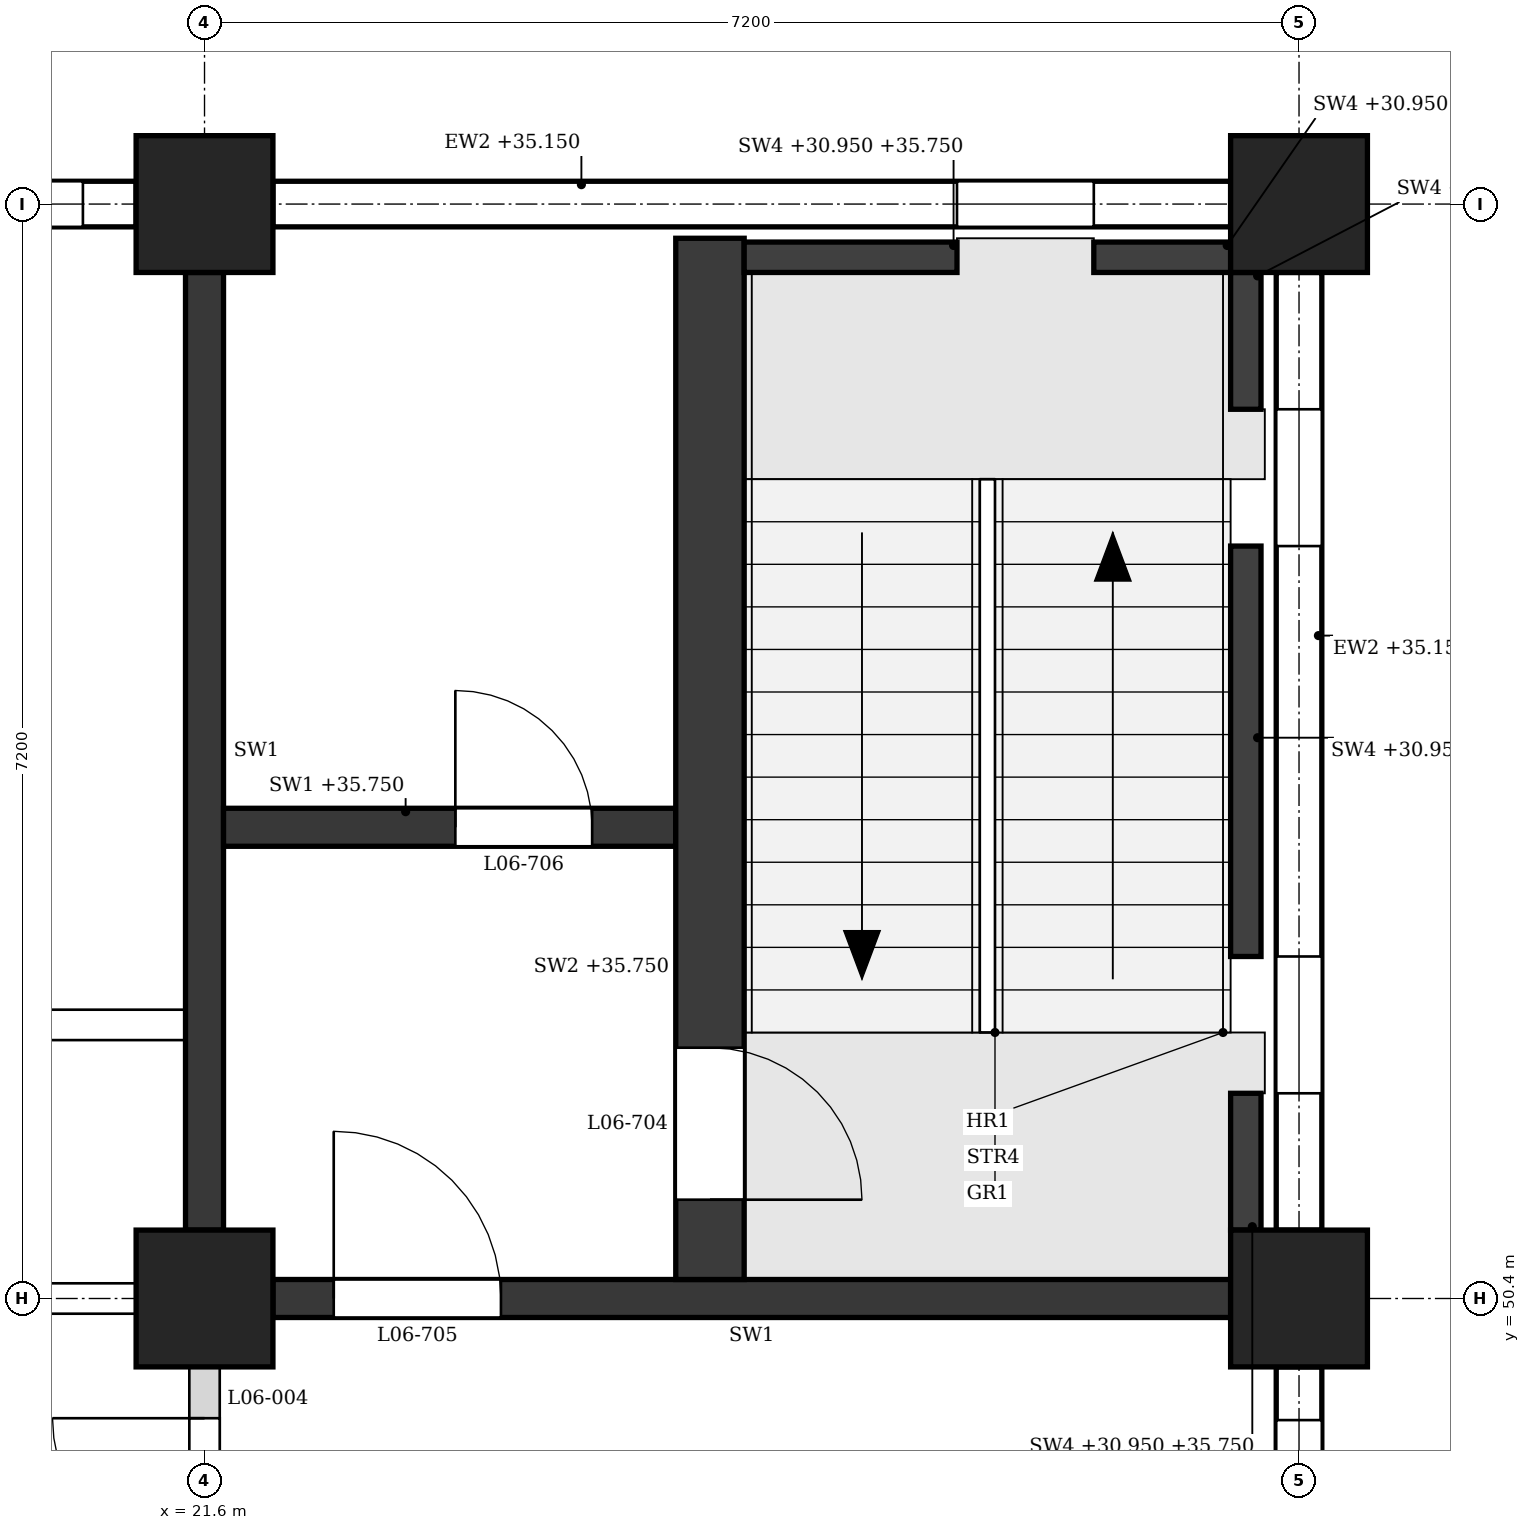
"""IFC4 building model, lengths in metres.
Left out: names, types, materials, properties, quantities, classifications, styles, units other than length and angle.
Written with IfcOpenShell. Run it as: python <this file> out.ifc"""

import sys

from ifc_helpers import new_model, si_unit, direction, frame, frame_2d, origin, origin_2d, place, context, subcontext, project, spatial, polyline, rectangle, outline, extrude, element, fill, save


model = new_model("IFC4")
c1 = context("Model", 3, precision=1e-05, world=origin(), true_north=direction((0.0, 1.0)))
c2 = subcontext(c1, "Body", "Model", "MODEL_VIEW")
j1 = project(units=[si_unit("LENGTHUNIT", "METRE"), si_unit("PLANEANGLEUNIT", "RADIAN")], contexts=[c1])
p1 = place(None, origin())
s1 = spatial("IfcSite", under=j1, at=p1, CompositionType="ELEMENT")
p2 = place(p1, origin())
s2 = spatial("IfcBuilding", under=s1, at=p2, CompositionType="ELEMENT")
p3 = place(p2, frame((0.0, 0.0, 31.2)))
s3 = spatial("IfcBuildingStorey", under=s2, at=p3, CompositionType="ELEMENT", Elevation=31.2)
for number, where, z_axis, x_axis in (
    (1, (21.6, 50.4, 0.0), (0.0, 0.0, 1.0), (1.0, 0.0, 0.0)),
    (2, (21.6, 57.6, 0.0), (0.0, 0.0, 1.0), (1.0, 0.0, 0.0)),
    (3, (28.8, 50.4, 0.0), (0.0, 0.0, 1.0), (1.0, 0.0, 0.0)),
    (4, (28.8, 57.6, 0.0), (0.0, 0.0, 1.0), (1.0, 0.0, 0.0)),
):
    element("IfcColumn", number, at=place(p3, frame(where, z_axis=z_axis, x_axis=x_axis)), inside=s3, PredefinedType="COLUMN", context=c2, shape_type="SweptSolid", body=[
        extrude(rectangle(XDim=0.9, YDim=0.9, at=origin_2d()), origin(), (0.0, 0.0, 1.0), 4.8),
    ])
p4 = place(p3, frame((28.35, 57.6, 0.0), z_axis=(0.0, 0.0, 1.0), x_axis=(-1.0, 0.0, 0.0)))
e5 = element("IfcWall", 5, at=p4, inside=s3, PredefinedType="STANDARD", context=c2, shape_type="SweptSolid", body=[
    extrude(rectangle(XDim=6.3, YDim=0.3, at=frame_2d((3.15, 0.0))), origin(), (0.0, 0.0, 1.0), 3.95),
])
p5 = place(p4, frame((0.9, 0.0, 0.9)))
e6 = element("IfcOpeningElement", 6, at=p5, cuts=e5, PredefinedType="OPENING", context=c2, shape_type="SweptSolid", body=[
    extrude(outline(polyline([(0.0, 0.0), (0.9, 0.0), (0.9, 2.05), (0.45, 2.5), (0.0, 2.05), (0.0, 0.0)])), frame((0.0, 0.16, 0.0), z_axis=(0.0, -1.0, 0.0), x_axis=(1.0, 0.0, 0.0)), (0.0, 0.0, 1.0), 0.32),
])
p6 = place(p3, frame((21.15, 57.6, 0.0), z_axis=(0.0, 0.0, 1.0), x_axis=(-1.0, 0.0, 0.0)))
e7 = element("IfcWall", 7, at=p6, inside=s3, PredefinedType="STANDARD", context=c2, shape_type="SweptSolid", body=[
    extrude(rectangle(XDim=6.3, YDim=0.3, at=frame_2d((3.15, 0.0))), origin(), (0.0, 0.0, 1.0), 3.95),
])
p7 = place(p6, frame((0.35, 0.0, 0.9)))
e8 = element("IfcOpeningElement", 8, at=p7, cuts=e7, PredefinedType="OPENING", context=c2, shape_type="SweptSolid", body=[
    extrude(outline(polyline([(0.0, 0.0), (0.85, 0.0), (0.85, 2.05), (0.425, 2.5), (0.0, 2.05), (0.0, 0.0)])), frame((0.0, 0.16, 0.0), z_axis=(0.0, -1.0, 0.0), x_axis=(1.0, 0.0, 0.0)), (0.0, 0.0, 1.0), 0.32),
])
p8 = place(p6, frame((1.5, 0.0, 0.9)))
e9 = element("IfcOpeningElement", 9, at=p8, cuts=e7, PredefinedType="OPENING", context=c2, shape_type="SweptSolid", body=[
    extrude(outline(polyline([(0.0, 0.0), (0.85, 0.0), (0.85, 2.05), (0.425, 2.5), (0.0, 2.05), (0.0, 0.0)])), frame((0.0, 0.16, 0.0), z_axis=(0.0, -1.0, 0.0), x_axis=(1.0, 0.0, 0.0)), (0.0, 0.0, 1.0), 0.32),
])
p9 = place(p6, frame((3.95, 0.0, 0.9)))
e10 = element("IfcOpeningElement", 10, at=p9, cuts=e7, PredefinedType="OPENING", context=c2, shape_type="SweptSolid", body=[
    extrude(outline(polyline([(0.0, 0.0), (0.85, 0.0), (0.85, 2.05), (0.425, 2.5), (0.0, 2.05), (0.0, 0.0)])), frame((0.0, 0.16, 0.0), z_axis=(0.0, -1.0, 0.0), x_axis=(1.0, 0.0, 0.0)), (0.0, 0.0, 1.0), 0.32),
])
p10 = place(p6, frame((5.1, 0.0, 0.9)))
e11 = element("IfcOpeningElement", 11, at=p10, cuts=e7, PredefinedType="OPENING", context=c2, shape_type="SweptSolid", body=[
    extrude(outline(polyline([(0.0, 0.0), (0.85, 0.0), (0.85, 2.05), (0.425, 2.5), (0.0, 2.05), (0.0, 0.0)])), frame((0.0, 0.16, 0.0), z_axis=(0.0, -1.0, 0.0), x_axis=(1.0, 0.0, 0.0)), (0.0, 0.0, 1.0), 0.32),
])
p11 = place(p3, frame((28.8, 43.65, 0.0), z_axis=(0.0, 0.0, 1.0), x_axis=(0.0, 1.0, 0.0)))
e12 = element("IfcWall", 12, at=p11, inside=s3, PredefinedType="STANDARD", context=c2, shape_type="SweptSolid", body=[
    extrude(rectangle(XDim=6.3, YDim=0.3, at=frame_2d((3.15, 0.0))), origin(), (0.0, 0.0, 1.0), 3.95),
])
p12 = place(p11, frame((3.95, 0.0, 0.9)))
e13 = element("IfcOpeningElement", 13, at=p12, cuts=e12, PredefinedType="OPENING", context=c2, shape_type="SweptSolid", body=[
    extrude(outline(polyline([(0.0, 0.0), (0.85, 0.0), (0.85, 2.05), (0.425, 2.5), (0.0, 2.05), (0.0, 0.0)])), frame((0.0, 0.16, 0.0), z_axis=(0.0, -1.0, 0.0), x_axis=(1.0, 0.0, 0.0)), (0.0, 0.0, 1.0), 0.32),
])
p13 = place(p11, frame((5.1, 0.0, 0.9)))
e14 = element("IfcOpeningElement", 14, at=p13, cuts=e12, PredefinedType="OPENING", context=c2, shape_type="SweptSolid", body=[
    extrude(outline(polyline([(0.0, 0.0), (0.85, 0.0), (0.85, 2.05), (0.425, 2.5), (0.0, 2.05), (0.0, 0.0)])), frame((0.0, 0.16, 0.0), z_axis=(0.0, -1.0, 0.0), x_axis=(1.0, 0.0, 0.0)), (0.0, 0.0, 1.0), 0.32),
])
p14 = place(p3, frame((28.8, 50.85, 0.0), z_axis=(0.0, 0.0, 1.0), x_axis=(0.0, 1.0, 0.0)))
e15 = element("IfcWall", 15, at=p14, inside=s3, PredefinedType="STANDARD", context=c2, shape_type="SweptSolid", body=[
    extrude(rectangle(XDim=6.3, YDim=0.3, at=frame_2d((3.15, 0.0))), origin(), (0.0, 0.0, 1.0), 3.95),
])
p15 = place(p14, frame((0.9, 0.0, 0.9)))
e16 = element("IfcOpeningElement", 16, at=p15, cuts=e15, PredefinedType="OPENING", context=c2, shape_type="SweptSolid", body=[
    extrude(outline(polyline([(0.0, 0.0), (0.9, 0.0), (0.9, 2.05), (0.45, 2.5), (0.0, 2.05), (0.0, 0.0)])), frame((0.0, 0.16, 0.0), z_axis=(0.0, -1.0, 0.0), x_axis=(1.0, 0.0, 0.0)), (0.0, 0.0, 1.0), 0.32),
])
p16 = place(p14, frame((4.5, 0.0, 0.9)))
e17 = element("IfcOpeningElement", 17, at=p16, cuts=e15, PredefinedType="OPENING", context=c2, shape_type="SweptSolid", body=[
    extrude(outline(polyline([(0.0, 0.0), (0.9, 0.0), (0.9, 2.05), (0.45, 2.5), (0.0, 2.05), (0.0, 0.0)])), frame((0.0, 0.16, 0.0), z_axis=(0.0, -1.0, 0.0), x_axis=(1.0, 0.0, 0.0)), (0.0, 0.0, 1.0), 0.32),
])
p17 = place(p3, frame((22.05, 50.4, 0.0), z_axis=(0.0, 0.0, 1.0), x_axis=(1.0, 0.0, 0.0)))
e18 = element("IfcWall", 18, at=p17, inside=s3, PredefinedType="SHEAR", context=c2, shape_type="SweptSolid", body=[
    extrude(rectangle(XDim=6.3, YDim=0.25, at=frame_2d((3.15, 0.0))), origin(), (0.0, 0.0, 1.0), 3.8),
])
p18 = place(p17, frame((0.4, 0.0, 0.0)))
e19 = element("IfcOpeningElement", 19, at=p18, cuts=e18, PredefinedType="OPENING", context=c2, shape_type="SweptSolid", body=[
    extrude(rectangle(XDim=1.1, YDim=2.1, at=frame_2d((0.55, 1.05))), frame((0.0, 0.135, 0.0), z_axis=(0.0, -1.0, 0.0), x_axis=(1.0, 0.0, 0.0)), (0.0, 0.0, 1.0), 0.27),
])
p19 = place(p3, frame((21.6, 50.85, 0.0), z_axis=(0.0, 0.0, 1.0), x_axis=(0.0, 1.0, 0.0)))
e20 = element("IfcWall", 20, at=p19, inside=s3, PredefinedType="SHEAR", context=c2, shape_type="SweptSolid", body=[
    extrude(rectangle(XDim=6.3, YDim=0.25, at=frame_2d((3.15, 0.0))), origin(), (0.0, 0.0, 1.0), 3.8),
])
p20 = place(p3, frame((28.45, 50.85, -0.25), z_axis=(0.0, 0.0, 1.0), x_axis=(0.0, 1.0, 0.0)))
e21 = element("IfcWall", 21, at=p20, inside=s3, PredefinedType="SHEAR", context=c2, shape_type="SweptSolid", body=[
    extrude(rectangle(XDim=0.9, YDim=0.2, at=frame_2d((0.45, 0.0))), origin(), (0.0, 0.0, 1.0), 4.8),
])
p21 = place(p3, frame((28.45, 52.65, -0.25), z_axis=(0.0, 0.0, 1.0), x_axis=(0.0, 1.0, 0.0)))
e22 = element("IfcWall", 22, at=p21, inside=s3, PredefinedType="SHEAR", context=c2, shape_type="SweptSolid", body=[
    extrude(rectangle(XDim=2.7, YDim=0.2, at=frame_2d((1.35, 0.0))), origin(), (0.0, 0.0, 1.0), 4.8),
])
p22 = place(p3, frame((28.45, 56.25, -0.25), z_axis=(0.0, 0.0, 1.0), x_axis=(0.0, 1.0, 0.0)))
e23 = element("IfcWall", 23, at=p22, inside=s3, PredefinedType="SHEAR", context=c2, shape_type="SweptSolid", body=[
    extrude(rectangle(XDim=0.9, YDim=0.2, at=frame_2d((0.45, 0.0))), origin(), (0.0, 0.0, 1.0), 4.8),
])
p23 = place(p3, frame((25.15, 57.25, -0.25), z_axis=(0.0, 0.0, 1.0), x_axis=(1.0, 0.0, 0.0)))
e24 = element("IfcWall", 24, at=p23, inside=s3, PredefinedType="SHEAR", context=c2, shape_type="SweptSolid", body=[
    extrude(rectangle(XDim=1.4, YDim=0.2, at=frame_2d((0.7, 0.0))), origin(), (0.0, 0.0, 1.0), 4.8),
])
p24 = place(p3, frame((27.45, 57.25, -0.25), z_axis=(0.0, 0.0, 1.0), x_axis=(1.0, 0.0, 0.0)))
e25 = element("IfcWall", 25, at=p24, inside=s3, PredefinedType="SHEAR", context=c2, shape_type="SweptSolid", body=[
    extrude(rectangle(XDim=0.9, YDim=0.2, at=frame_2d((0.45, 0.0))), origin(), (0.0, 0.0, 1.0), 4.8),
])
p25 = place(p3, frame((24.925, 50.525, 0.0), z_axis=(0.0, 0.0, 1.0), x_axis=(0.0, 1.0, 0.0)))
e26 = element("IfcWall", 26, at=p25, inside=s3, PredefinedType="SHEAR", context=c2, shape_type="SweptSolid", body=[
    extrude(rectangle(XDim=6.85, YDim=0.45, at=frame_2d((3.425, 0.0))), origin(), (0.0, 0.0, 1.0), 4.55),
])
p26 = place(p25, frame((0.525, 0.0, 0.0)))
e27 = element("IfcOpeningElement", 27, at=p26, cuts=e26, PredefinedType="OPENING", context=c2, shape_type="SweptSolid", body=[
    extrude(rectangle(XDim=1.0, YDim=2.1, at=frame_2d((0.5, 1.05))), frame((0.0, 0.235, 0.0), z_axis=(0.0, -1.0, 0.0), x_axis=(1.0, 0.0, 0.0)), (0.0, 0.0, 1.0), 0.47),
])
p27 = place(p3, frame((21.725, 53.5, 0.0), z_axis=(0.0, 0.0, 1.0), x_axis=(1.0, 0.0, 0.0)))
e28 = element("IfcWall", 28, at=p27, inside=s3, PredefinedType="SHEAR", context=c2, shape_type="SweptSolid", body=[
    extrude(rectangle(XDim=2.975, YDim=0.25, at=frame_2d((1.487, 0.0))), origin(), (0.0, 0.0, 1.0), 4.55),
])
p28 = place(p27, frame((1.525, 0.0, 0.0)))
e29 = element("IfcOpeningElement", 29, at=p28, cuts=e28, PredefinedType="OPENING", context=c2, shape_type="SweptSolid", body=[
    extrude(rectangle(XDim=0.9, YDim=2.1, at=frame_2d((0.45, 1.05))), frame((0.0, 0.135, 0.0), z_axis=(0.0, -1.0, 0.0), x_axis=(1.0, 0.0, 0.0)), (0.0, 0.0, 1.0), 0.27),
])
p29 = place(p3, frame((14.85, 50.4, 0.0), z_axis=(0.0, 0.0, 1.0), x_axis=(1.0, 0.0, 0.0)))
e30 = element("IfcWall", 30, at=p29, inside=s3, PredefinedType="PARTITIONING", context=c2, shape_type="SweptSolid", body=[
    extrude(rectangle(XDim=6.3, YDim=0.2, at=frame_2d((3.15, 0.0))), origin(), (0.0, 0.0, 1.0), 3.8),
])
p30 = place(p29, frame((4.225, 0.0, 0.0)))
e31 = element("IfcOpeningElement", 31, at=p30, cuts=e30, PredefinedType="OPENING", context=c2, shape_type="SweptSolid", body=[
    extrude(rectangle(XDim=1.0, YDim=2.1, at=frame_2d((0.5, 1.05))), frame((0.0, 0.11, 0.0), z_axis=(0.0, -1.0, 0.0), x_axis=(1.0, 0.0, 0.0)), (0.0, 0.0, 1.0), 0.22),
])
p31 = place(p3, frame((7.325, 52.2, 0.0), z_axis=(0.0, 0.0, 1.0), x_axis=(1.0, 0.0, 0.0)))
e32 = element("IfcWall", 32, at=p31, inside=s3, PredefinedType="PARTITIONING", context=c2, shape_type="SweptSolid", body=[
    extrude(outline(polyline([(0.0, 0.0), (14.15, 0.0), (14.15, 3.8), (14.025, 3.8), (14.025, 4.55), (7.325, 4.55), (7.325, 3.8), (6.825, 3.8), (6.825, 4.55), (0.125, 4.55), (0.125, 3.8), (0.0, 3.8), (0.0, 0.0)])), frame((0.0, 0.1, 0.0), z_axis=(0.0, -1.0, 0.0), x_axis=(1.0, 0.0, 0.0)), (0.0, 0.0, 1.0), 0.2),
])
p32 = place(p31, frame((1.238, 0.0, 0.0)))
e33 = element("IfcOpeningElement", 33, at=p32, cuts=e32, PredefinedType="OPENING", context=c2, shape_type="SweptSolid", body=[
    extrude(rectangle(XDim=1.0, YDim=2.1, at=frame_2d((0.5, 1.05))), frame((0.0, 0.11, 0.0), z_axis=(0.0, -1.0, 0.0), x_axis=(1.0, 0.0, 0.0)), (0.0, 0.0, 1.0), 0.22),
])
p33 = place(p31, frame((4.775, 0.0, 0.0)))
e34 = element("IfcOpeningElement", 34, at=p33, cuts=e32, PredefinedType="OPENING", context=c2, shape_type="SweptSolid", body=[
    extrude(rectangle(XDim=1.0, YDim=2.1, at=frame_2d((0.5, 1.05))), frame((0.0, 0.11, 0.0), z_axis=(0.0, -1.0, 0.0), x_axis=(1.0, 0.0, 0.0)), (0.0, 0.0, 1.0), 0.22),
])
p34 = place(p31, frame((8.375, 0.0, 0.0)))
e35 = element("IfcOpeningElement", 35, at=p34, cuts=e32, PredefinedType="OPENING", context=c2, shape_type="SweptSolid", body=[
    extrude(rectangle(XDim=1.0, YDim=2.1, at=frame_2d((0.5, 1.05))), frame((0.0, 0.11, 0.0), z_axis=(0.0, -1.0, 0.0), x_axis=(1.0, 0.0, 0.0)), (0.0, 0.0, 1.0), 0.22),
])
p35 = place(p31, frame((11.913, 0.0, 0.0)))
e36 = element("IfcOpeningElement", 36, at=p35, cuts=e32, PredefinedType="OPENING", context=c2, shape_type="SweptSolid", body=[
    extrude(rectangle(XDim=1.0, YDim=2.1, at=frame_2d((0.5, 1.05))), frame((0.0, 0.11, 0.0), z_axis=(0.0, -1.0, 0.0), x_axis=(1.0, 0.0, 0.0)), (0.0, 0.0, 1.0), 0.22),
])
p36 = place(p3, frame((21.6, 47.275, 0.0), z_axis=(0.0, 0.0, 1.0), x_axis=(0.0, 1.0, 0.0)))
e37 = element("IfcWall", 37, at=p36, inside=s3, PredefinedType="PARTITIONING", context=c2, shape_type="SweptSolid", body=[
    extrude(rectangle(XDim=2.675, YDim=0.2, at=frame_2d((1.337, 0.0))), origin(), (0.0, 0.0, 1.0), 3.8),
])
p37 = place(p36, frame((0.337, 0.0, 0.0)))
e38 = element("IfcOpeningElement", 38, at=p37, cuts=e37, PredefinedType="OPENING", context=c2, shape_type="SweptSolid", body=[
    extrude(rectangle(XDim=2.0, YDim=2.4, at=frame_2d((1.0, 1.2))), frame((0.0, 0.11, 0.0), z_axis=(0.0, -1.0, 0.0), x_axis=(1.0, 0.0, 0.0)), (0.0, 0.0, 1.0), 0.22),
])
p38 = place(p13, origin())
e39 = element("IfcWindow", 39, at=p38, inside=s3, PartitioningType="SINGLE_PANEL", PredefinedType="WINDOW", context=c2, shape_type="SweptSolid", body=[
    extrude(outline(polyline([(0.0, 0.0), (0.85, 0.0), (0.85, 2.05), (0.425, 2.5), (0.0, 2.05), (0.0, 0.0)])), frame((0.0, 0.03, 0.0), z_axis=(0.0, -1.0, 0.0), x_axis=(1.0, 0.0, 0.0)), (0.0, 0.0, 1.0), 0.06),
])
fill(e14, e39)
p39 = place(p15, origin())
e40 = element("IfcWindow", 40, at=p39, inside=s3, PartitioningType="SINGLE_PANEL", PredefinedType="WINDOW", context=c2, shape_type="SweptSolid", body=[
    extrude(outline(polyline([(0.0, 0.0), (0.9, 0.0), (0.9, 2.05), (0.45, 2.5), (0.0, 2.05), (0.0, 0.0)])), frame((0.0, 0.03, 0.0), z_axis=(0.0, -1.0, 0.0), x_axis=(1.0, 0.0, 0.0)), (0.0, 0.0, 1.0), 0.06),
])
fill(e16, e40)
p40 = place(p16, origin())
e41 = element("IfcWindow", 41, at=p40, inside=s3, PartitioningType="SINGLE_PANEL", PredefinedType="WINDOW", context=c2, shape_type="SweptSolid", body=[
    extrude(outline(polyline([(0.0, 0.0), (0.9, 0.0), (0.9, 2.05), (0.45, 2.5), (0.0, 2.05), (0.0, 0.0)])), frame((0.0, 0.03, 0.0), z_axis=(0.0, -1.0, 0.0), x_axis=(1.0, 0.0, 0.0)), (0.0, 0.0, 1.0), 0.06),
])
fill(e17, e41)
p41 = place(p5, origin())
e42 = element("IfcWindow", 42, at=p41, inside=s3, PartitioningType="SINGLE_PANEL", PredefinedType="WINDOW", context=c2, shape_type="SweptSolid", body=[
    extrude(outline(polyline([(0.0, 0.0), (0.9, 0.0), (0.9, 2.05), (0.45, 2.5), (0.0, 2.05), (0.0, 0.0)])), frame((0.0, 0.03, 0.0), z_axis=(0.0, -1.0, 0.0), x_axis=(1.0, 0.0, 0.0)), (0.0, 0.0, 1.0), 0.06),
])
fill(e6, e42)
p42 = place(p7, origin())
e43 = element("IfcWindow", 43, at=p42, inside=s3, PartitioningType="SINGLE_PANEL", PredefinedType="WINDOW", context=c2, shape_type="SweptSolid", body=[
    extrude(outline(polyline([(0.0, 0.0), (0.85, 0.0), (0.85, 2.05), (0.425, 2.5), (0.0, 2.05), (0.0, 0.0)])), frame((0.0, 0.03, 0.0), z_axis=(0.0, -1.0, 0.0), x_axis=(1.0, 0.0, 0.0)), (0.0, 0.0, 1.0), 0.06),
])
fill(e8, e43)
p43 = place(p26, frame((1.0, 0.0, 0.0), z_axis=(0.0, 0.0, 1.0), x_axis=(-1.0, 0.0, 0.0)))
e44 = element("IfcDoor", 44, at=p43, inside=s3, OperationType="SINGLE_SWING_RIGHT", PredefinedType="DOOR", context=c2, shape_type="SweptSolid", body=[
    extrude(rectangle(XDim=1.0, YDim=2.1, at=frame_2d((0.5, 1.05))), frame((0.0, 0.025, 0.0), z_axis=(0.0, -1.0, 0.0), x_axis=(1.0, 0.0, 0.0)), (0.0, 0.0, 1.0), 0.05),
])
fill(e27, e44)
p44 = place(p18, origin())
e45 = element("IfcDoor", 45, at=p44, inside=s3, OperationType="SINGLE_SWING_LEFT", PredefinedType="DOOR", context=c2, shape_type="SweptSolid", body=[
    extrude(rectangle(XDim=1.1, YDim=2.1, at=frame_2d((0.55, 1.05))), frame((0.0, 0.025, 0.0), z_axis=(0.0, -1.0, 0.0), x_axis=(1.0, 0.0, 0.0)), (0.0, 0.0, 1.0), 0.05),
])
fill(e19, e45)
p45 = place(p28, origin())
e46 = element("IfcDoor", 46, at=p45, inside=s3, OperationType="SINGLE_SWING_LEFT", PredefinedType="DOOR", context=c2, shape_type="SweptSolid", body=[
    extrude(rectangle(XDim=0.9, YDim=2.1, at=frame_2d((0.45, 1.05))), frame((0.0, 0.025, 0.0), z_axis=(0.0, -1.0, 0.0), x_axis=(1.0, 0.0, 0.0)), (0.0, 0.0, 1.0), 0.05),
])
fill(e29, e46)
p46 = place(p37, origin())
e47 = element("IfcDoor", 47, at=p46, inside=s3, OperationType="DOUBLE_DOOR_SINGLE_SWING", PredefinedType="DOOR", context=c2, shape_type="SweptSolid", body=[
    extrude(rectangle(XDim=2.0, YDim=2.4, at=frame_2d((1.0, 1.2))), frame((0.0, 0.025, 0.0), z_axis=(0.0, -1.0, 0.0), x_axis=(1.0, 0.0, 0.0)), (0.0, 0.0, 1.0), 0.05),
])
fill(e38, e47)
save(model, sys.argv[1])
